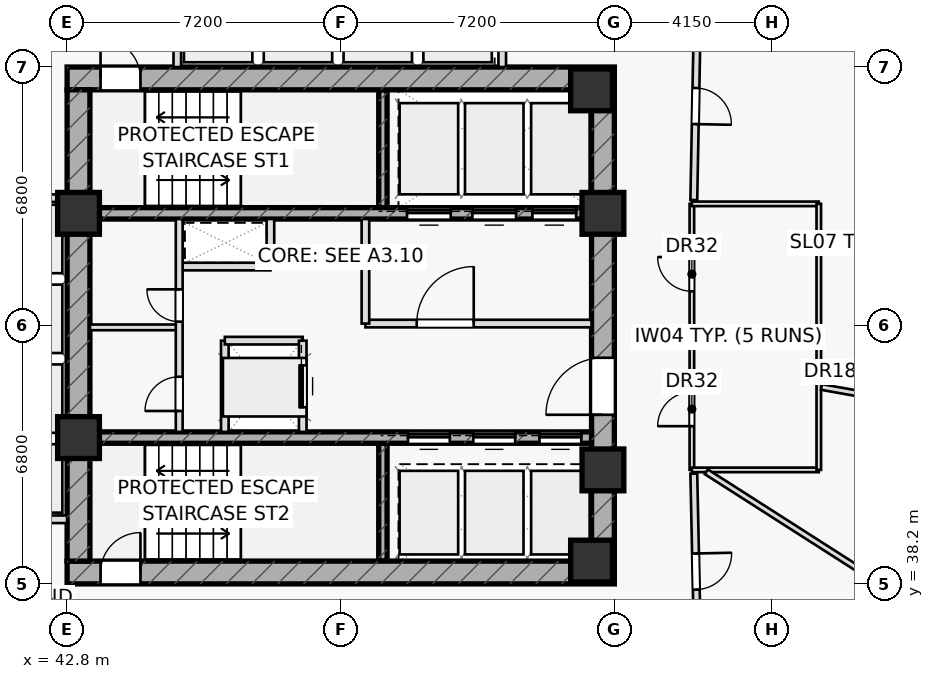
"""IFC4 building model, lengths in metres.
Left out: names, types, materials, properties, quantities, classifications, styles, units other than length and angle.
Written with IfcOpenShell. Run it as: python <this file> out.ifc"""

import sys

from ifc_helpers import new_model, si_unit, direction, frame, frame_2d, origin, origin_2d, place, context, subcontext, project, spatial, rectangle, extrude, element, fill, save


model = new_model("IFC4")
c1 = context("Model", 3, precision=1e-05, world=origin(), true_north=direction((0.0, 1.0)))
c2 = subcontext(c1, "Body", "Model", "MODEL_VIEW")
j1 = project(units=[si_unit("LENGTHUNIT", "METRE"), si_unit("PLANEANGLEUNIT", "RADIAN")], contexts=[c1])
p1 = place(None, origin())
s1 = spatial("IfcSite", under=j1, at=p1, CompositionType="ELEMENT")
p2 = place(p1, origin())
s2 = spatial("IfcBuilding", under=s1, at=p2, CompositionType="ELEMENT")
p3 = place(p2, frame((0.0, 0.0, 110.4)))
s3 = spatial("IfcBuildingStorey", under=s2, at=p3, CompositionType="ELEMENT", Elevation=110.4)
for number, where, z_axis, x_axis in (
    (1, (51.11, 48.1, 0.0), (0.0, 0.0, 1.0), (0.0, 1.0, 0.0)),
    (2, (51.11, 38.8, 0.0), (0.0, 0.0, 1.0), (0.0, 1.0, 0.0)),
):
    element("IfcWall", number, at=place(p3, frame(where, z_axis=z_axis, x_axis=x_axis)), inside=s3, PredefinedType="SHEAR", context=c2, shape_type="SweptSolid", body=[
        extrude(rectangle(XDim=3.1, YDim=0.22, at=frame_2d((1.55, 0.0))), origin(), (0.0, 0.0, 1.0), 4.9),
    ])
p4 = place(p3, frame((42.8, 51.5, 0.0), z_axis=(0.0, 0.0, 1.0), x_axis=(1.0, 0.0, 0.0)))
e3 = element("IfcWall", 3, at=p4, inside=s3, PredefinedType="SHEAR", context=c2, shape_type="SweptSolid", body=[
    extrude(rectangle(XDim=14.4, YDim=0.6, at=frame_2d((7.2, 0.0))), origin(), (0.0, 0.0, 1.0), 4.9),
])
p5 = place(p4, frame((0.88, 0.0, 0.0)))
e4 = element("IfcOpeningElement", 4, at=p5, cuts=e3, PredefinedType="OPENING", context=c2, shape_type="SweptSolid", body=[
    extrude(rectangle(XDim=1.05, YDim=2.2, at=frame_2d((0.525, 1.1))), frame((0.0, 0.31, 0.0), z_axis=(0.0, -1.0, 0.0), x_axis=(1.0, 0.0, 0.0)), (0.0, 0.0, 1.0), 0.62),
])
p6 = place(p3, frame((42.8, 38.5, 0.0), z_axis=(0.0, 0.0, 1.0), x_axis=(1.0, 0.0, 0.0)))
e5 = element("IfcWall", 5, at=p6, inside=s3, PredefinedType="SHEAR", context=c2, shape_type="SweptSolid", body=[
    extrude(rectangle(XDim=14.4, YDim=0.6, at=frame_2d((7.2, 0.0))), origin(), (0.0, 0.0, 1.0), 4.9),
])
p7 = place(p6, frame((0.88, 0.0, 0.0)))
e6 = element("IfcOpeningElement", 6, at=p7, cuts=e5, PredefinedType="OPENING", context=c2, shape_type="SweptSolid", body=[
    extrude(rectangle(XDim=1.05, YDim=2.2, at=frame_2d((0.525, 1.1))), frame((0.0, 0.31, 0.0), z_axis=(0.0, -1.0, 0.0), x_axis=(1.0, 0.0, 0.0)), (0.0, 0.0, 1.0), 0.62),
])
p8 = place(p3, frame((43.1, 38.8, 0.0), z_axis=(0.0, 0.0, 1.0), x_axis=(0.0, 1.0, 0.0)))
e7 = element("IfcWall", 7, at=p8, inside=s3, PredefinedType="SHEAR", context=c2, shape_type="SweptSolid", body=[
    extrude(rectangle(XDim=12.4, YDim=0.6, at=frame_2d((6.2, 0.0))), origin(), (0.0, 0.0, 1.0), 4.9),
])
p9 = place(p3, frame((56.9, 38.8, 0.0), z_axis=(0.0, 0.0, 1.0), x_axis=(0.0, 1.0, 0.0)))
e8 = element("IfcWall", 8, at=p9, inside=s3, PredefinedType="SHEAR", context=c2, shape_type="SweptSolid", body=[
    extrude(rectangle(XDim=12.4, YDim=0.6, at=frame_2d((6.2, 0.0))), origin(), (0.0, 0.0, 1.0), 4.9),
])
p10 = place(p9, frame((3.85, 0.0, 0.0)))
e9 = element("IfcOpeningElement", 9, at=p10, cuts=e8, PredefinedType="OPENING", context=c2, shape_type="SweptSolid", body=[
    extrude(rectangle(XDim=1.5, YDim=2.2, at=frame_2d((0.75, 1.1))), frame((0.0, 0.31, 0.0), z_axis=(0.0, -1.0, 0.0), x_axis=(1.0, 0.0, 0.0)), (0.0, 0.0, 1.0), 0.62),
])
p11 = place(p3, frame((43.4, 47.95, 0.0), z_axis=(0.0, 0.0, 1.0), x_axis=(1.0, 0.0, 0.0)))
e10 = element("IfcWall", 10, at=p11, inside=s3, PredefinedType="SHEAR", context=c2, shape_type="SweptSolid", body=[
    extrude(rectangle(XDim=13.2, YDim=0.3, at=frame_2d((6.6, 0.0))), origin(), (0.0, 0.0, 1.0), 4.9),
])
p12 = place(p11, frame((8.345, 0.0, 0.0)))
e11 = element("IfcOpeningElement", 11, at=p12, cuts=e10, PredefinedType="OPENING", context=c2, shape_type="SweptSolid", body=[
    extrude(rectangle(XDim=1.15, YDim=2.2, at=frame_2d((0.575, 1.1))), frame((0.0, 0.16, 0.0), z_axis=(0.0, -1.0, 0.0), x_axis=(1.0, 0.0, 0.0)), (0.0, 0.0, 1.0), 0.32),
])
p13 = place(p11, frame((10.065, 0.0, 0.0)))
e12 = element("IfcOpeningElement", 12, at=p13, cuts=e10, PredefinedType="OPENING", context=c2, shape_type="SweptSolid", body=[
    extrude(rectangle(XDim=1.15, YDim=2.2, at=frame_2d((0.575, 1.1))), frame((0.0, 0.16, 0.0), z_axis=(0.0, -1.0, 0.0), x_axis=(1.0, 0.0, 0.0)), (0.0, 0.0, 1.0), 0.32),
])
p14 = place(p11, frame((11.645, 0.0, 0.0)))
e13 = element("IfcOpeningElement", 13, at=p14, cuts=e10, PredefinedType="OPENING", context=c2, shape_type="SweptSolid", body=[
    extrude(rectangle(XDim=1.15, YDim=2.2, at=frame_2d((0.575, 1.1))), frame((0.0, 0.16, 0.0), z_axis=(0.0, -1.0, 0.0), x_axis=(1.0, 0.0, 0.0)), (0.0, 0.0, 1.0), 0.32),
])
p15 = place(p3, frame((43.4, 42.05, 0.0), z_axis=(0.0, 0.0, 1.0), x_axis=(1.0, 0.0, 0.0)))
e14 = element("IfcWall", 14, at=p15, inside=s3, PredefinedType="SHEAR", context=c2, shape_type="SweptSolid", body=[
    extrude(rectangle(XDim=13.2, YDim=0.3, at=frame_2d((6.6, 0.0))), origin(), (0.0, 0.0, 1.0), 4.9),
])
p16 = place(p15, frame((8.37, 0.0, 0.0)))
e15 = element("IfcOpeningElement", 15, at=p16, cuts=e14, PredefinedType="OPENING", context=c2, shape_type="SweptSolid", body=[
    extrude(rectangle(XDim=1.1, YDim=2.15, at=frame_2d((0.55, 1.075))), frame((0.0, 0.16, 0.0), z_axis=(0.0, -1.0, 0.0), x_axis=(1.0, 0.0, 0.0)), (0.0, 0.0, 1.0), 0.32),
])
p17 = place(p15, frame((10.09, 0.0, 0.0)))
e16 = element("IfcOpeningElement", 16, at=p17, cuts=e14, PredefinedType="OPENING", context=c2, shape_type="SweptSolid", body=[
    extrude(rectangle(XDim=1.1, YDim=2.15, at=frame_2d((0.55, 1.075))), frame((0.0, 0.16, 0.0), z_axis=(0.0, -1.0, 0.0), x_axis=(1.0, 0.0, 0.0)), (0.0, 0.0, 1.0), 0.32),
])
p18 = place(p15, frame((11.83, 0.0, 0.0)))
e17 = element("IfcOpeningElement", 17, at=p18, cuts=e14, PredefinedType="OPENING", context=c2, shape_type="SweptSolid", body=[
    extrude(rectangle(XDim=1.1, YDim=2.15, at=frame_2d((0.55, 1.075))), frame((0.0, 0.16, 0.0), z_axis=(0.0, -1.0, 0.0), x_axis=(1.0, 0.0, 0.0)), (0.0, 0.0, 1.0), 0.32),
])
for number, where, z_axis, x_axis in (
    (18, (43.1, 47.95, 0.0), (0.0, 0.0, 1.0), (1.0, 0.0, 0.0)),
    (19, (56.9, 47.95, 0.0), (0.0, 0.0, 1.0), (1.0, 0.0, 0.0)),
    (20, (56.6, 51.2, 0.0), (0.0, 0.0, 1.0), (1.0, 0.0, 0.0)),
    (21, (43.1, 42.05, 0.0), (0.0, 0.0, 1.0), (1.0, 0.0, 0.0)),
    (22, (56.9, 41.2, 0.0), (0.0, 0.0, 1.0), (1.0, 0.0, 0.0)),
    (23, (56.6, 38.8, 0.0), (0.0, 0.0, 1.0), (1.0, 0.0, 0.0)),
):
    element("IfcColumn", number, at=place(p3, frame(where, z_axis=z_axis, x_axis=x_axis)), inside=s3, PredefinedType="COLUMN", context=c2, shape_type="SweptSolid", body=[
        extrude(rectangle(XDim=1.1, YDim=1.1, at=origin_2d()), origin(), (0.0, 0.0, 1.0), 4.9),
    ])
for number, where, z_axis, x_axis in (
    (24, (40.3, 39.9, 0.0), (0.0, 0.0, 1.0), (1.0, 0.0, 0.0)),
    (25, (40.3, 48.35, 0.0), (0.0, 0.0, 1.0), (1.0, 0.0, 0.0)),
    (26, (45.7, 51.8, 0.0), (0.0, 0.0, 1.0), (0.0, 1.0, 0.0)),
    (27, (54.25, 51.8, 0.0), (0.0, 0.0, 1.0), (0.0, 1.0, 0.0)),
):
    element("IfcWall", number, at=place(p3, frame(where, z_axis=z_axis, x_axis=x_axis)), inside=s3, PredefinedType="PARTITIONING", context=c2, shape_type="SweptSolid", body=[
        extrude(rectangle(XDim=2.5, YDim=0.2, at=frame_2d((1.25, 0.0))), origin(), (0.0, 0.0, 1.0), 4.9),
    ])
p19 = place(p3, frame((45.75, 46.55, 0.0), z_axis=(0.0, 0.0, 1.0), x_axis=(1.0, 0.0, 0.0)))
e28 = element("IfcWall", 28, at=p19, inside=s3, PredefinedType="PARTITIONING", context=c2, shape_type="SweptSolid", body=[
    extrude(rectangle(XDim=2.4, YDim=0.2, at=frame_2d((1.2, 0.0))), origin(), (0.0, 0.0, 1.0), 4.9),
])
p20 = place(p3, frame((48.15, 46.55, 0.0), z_axis=(0.0, 0.0, 1.0), x_axis=(0.0, 1.0, 0.0)))
e29 = element("IfcWall", 29, at=p20, inside=s3, PredefinedType="PARTITIONING", context=c2, shape_type="SweptSolid", body=[
    extrude(rectangle(XDim=1.25, YDim=0.2, at=frame_2d((0.625, 0.0))), origin(), (0.0, 0.0, 1.0), 4.9),
])
p21 = place(p3, frame((46.95, 42.2, 0.0), z_axis=(0.0, 0.0, 1.0), x_axis=(0.0, 1.0, 0.0)))
e30 = element("IfcWall", 30, at=p21, inside=s3, PredefinedType="PARTITIONING", context=c2, shape_type="SweptSolid", body=[
    extrude(rectangle(XDim=2.4, YDim=0.2, at=frame_2d((1.2, 0.0))), origin(), (0.0, 0.0, 1.0), 4.9),
])
p22 = place(p3, frame((46.95, 44.6, 0.0), z_axis=(0.0, 0.0, 1.0), x_axis=(1.0, 0.0, 0.0)))
e31 = element("IfcWall", 31, at=p22, inside=s3, PredefinedType="PARTITIONING", context=c2, shape_type="SweptSolid", body=[
    extrude(rectangle(XDim=2.05, YDim=0.2, at=frame_2d((1.025, 0.0))), origin(), (0.0, 0.0, 1.0), 4.9),
])
p23 = place(p3, frame((50.65, 45.05, 0.0), z_axis=(0.0, 0.0, 1.0), x_axis=(1.0, 0.0, 0.0)))
e32 = element("IfcWall", 32, at=p23, inside=s3, PredefinedType="PARTITIONING", context=c2, shape_type="SweptSolid", body=[
    extrude(rectangle(XDim=5.95, YDim=0.2, at=frame_2d((2.975, 0.0))), origin(), (0.0, 0.0, 1.0), 4.9),
])
p24 = place(p23, frame((1.35, 0.0, 0.0)))
e33 = element("IfcOpeningElement", 33, at=p24, cuts=e32, PredefinedType="OPENING", context=c2, shape_type="SweptSolid", body=[
    extrude(rectangle(XDim=1.5, YDim=2.2, at=frame_2d((0.75, 1.1))), frame((0.0, 0.11, 0.0), z_axis=(0.0, -1.0, 0.0), x_axis=(1.0, 0.0, 0.0)), (0.0, 0.0, 1.0), 0.22),
])
p25 = place(p3, frame((50.65, 45.05, 0.0), z_axis=(0.0, 0.0, 1.0), x_axis=(0.0, 1.0, 0.0)))
e34 = element("IfcWall", 34, at=p25, inside=s3, PredefinedType="PARTITIONING", context=c2, shape_type="SweptSolid", body=[
    extrude(rectangle(XDim=2.75, YDim=0.2, at=frame_2d((1.375, 0.0))), origin(), (0.0, 0.0, 1.0), 4.9),
])
p26 = place(p3, frame((43.4, 44.95, 0.0), z_axis=(0.0, 0.0, 1.0), x_axis=(1.0, 0.0, 0.0)))
e35 = element("IfcWall", 35, at=p26, inside=s3, PredefinedType="PARTITIONING", context=c2, shape_type="SweptSolid", body=[
    extrude(rectangle(XDim=2.35, YDim=0.15, at=frame_2d((1.175, 0.0))), origin(), (0.0, 0.0, 1.0), 4.9),
])
p27 = place(p3, frame((45.75, 42.2, 0.0), z_axis=(0.0, 0.0, 1.0), x_axis=(0.0, 1.0, 0.0)))
e36 = element("IfcWall", 36, at=p27, inside=s3, PredefinedType="PARTITIONING", context=c2, shape_type="SweptSolid", body=[
    extrude(rectangle(XDim=5.6, YDim=0.18, at=frame_2d((2.8, 0.0))), origin(), (0.0, 0.0, 1.0), 4.9),
])
p28 = place(p27, frame((0.55, 0.0, 0.0)))
e37 = element("IfcOpeningElement", 37, at=p28, cuts=e36, PredefinedType="OPENING", context=c2, shape_type="SweptSolid", body=[
    extrude(rectangle(XDim=0.9, YDim=2.05, at=frame_2d((0.45, 1.025))), frame((0.0, 0.1, 0.0), z_axis=(0.0, -1.0, 0.0), x_axis=(1.0, 0.0, 0.0)), (0.0, 0.0, 1.0), 0.2),
])
p29 = place(p27, frame((2.9, 0.0, 0.0)))
e38 = element("IfcOpeningElement", 38, at=p29, cuts=e36, PredefinedType="OPENING", context=c2, shape_type="SweptSolid", body=[
    extrude(rectangle(XDim=0.85, YDim=2.05, at=frame_2d((0.425, 1.025))), frame((0.0, 0.1, 0.0), z_axis=(0.0, -1.0, 0.0), x_axis=(1.0, 0.0, 0.0)), (0.0, 0.0, 1.0), 0.2),
])
p30 = place(p3, frame((59.24, 41.2, 0.0), z_axis=(0.0, 0.0, 1.0), x_axis=(0.0, 1.0, 0.0)))
e39 = element("IfcWall", 39, at=p30, inside=s3, PredefinedType="PARTITIONING", context=c2, shape_type="SweptSolid", body=[
    extrude(rectangle(XDim=7.0, YDim=0.12, at=frame_2d((3.5, 0.0))), origin(), (0.0, 0.0, 1.0), 4.9),
])
p31 = place(p30, frame((1.15, 0.0, 0.0)))
e40 = element("IfcOpeningElement", 40, at=p31, cuts=e39, PredefinedType="OPENING", context=c2, shape_type="SweptSolid", body=[
    extrude(rectangle(XDim=0.9, YDim=2.05, at=frame_2d((0.45, 1.025))), frame((0.0, 0.07, 0.0), z_axis=(0.0, -1.0, 0.0), x_axis=(1.0, 0.0, 0.0)), (0.0, 0.0, 1.0), 0.14),
])
p32 = place(p30, frame((4.7, 0.0, 0.0)))
e41 = element("IfcOpeningElement", 41, at=p32, cuts=e39, PredefinedType="OPENING", context=c2, shape_type="SweptSolid", body=[
    extrude(rectangle(XDim=0.9, YDim=2.05, at=frame_2d((0.45, 1.025))), frame((0.0, 0.07, 0.0), z_axis=(0.0, -1.0, 0.0), x_axis=(1.0, 0.0, 0.0)), (0.0, 0.0, 1.0), 0.14),
])
for number, where, z_axis, x_axis in (
    (42, (59.24, 41.2, 0.0), (0.0, 0.0, 1.0), (1.0, 0.0, 0.0)),
    (43, (59.24, 44.65, 0.0), (0.0, 0.0, 1.0), (1.0, 0.0, 0.0)),
    (44, (59.24, 48.2, 0.0), (0.0, 0.0, 1.0), (1.0, 0.0, 0.0)),
):
    element("IfcWall", number, at=place(p3, frame(where, z_axis=z_axis, x_axis=x_axis)), inside=s3, PredefinedType="PARTITIONING", context=c2, shape_type="SweptSolid", body=[
        extrude(rectangle(XDim=3.34, YDim=0.12, at=frame_2d((1.67, 0.0))), origin(), (0.0, 0.0, 1.0), 4.9),
    ])
p33 = place(p3, frame((62.58, 41.2, 0.0), z_axis=(0.0, 0.0, 1.0), x_axis=(0.0, 1.0, 0.0)))
e45 = element("IfcWall", 45, at=p33, inside=s3, PredefinedType="PARTITIONING", context=c2, shape_type="SweptSolid", body=[
    extrude(rectangle(XDim=7.0, YDim=0.12, at=frame_2d((3.5, 0.0))), origin(), (0.0, 0.0, 1.0), 4.9),
])
p34 = place(p3, frame((59.621, 41.15, 0.0), z_axis=(0.0, 0.0, 1.0), x_axis=(0.842493606908, -0.538706341451, 0.0)))
e46 = element("IfcWall", 46, at=p34, inside=s3, PredefinedType="PARTITIONING", context=c2, shape_type="SweptSolid", body=[
    extrude(rectangle(XDim=18.711, YDim=0.15, at=frame_2d((9.355, 0.0))), origin(), (0.0, 0.0, 1.0), 4.185),
])
p35 = place(p3, frame((62.65, 43.381, 0.0), z_axis=(0.0, 0.0, 1.0), x_axis=(0.984377109133, -0.176073016146, 0.0)))
e47 = element("IfcWall", 47, at=p35, inside=s3, PredefinedType="PARTITIONING", context=c2, shape_type="SweptSolid", body=[
    extrude(rectangle(XDim=21.754, YDim=0.15, at=frame_2d((10.877, 0.0))), origin(), (0.0, 0.0, 1.0), 4.185),
])
p36 = place(p35, frame((1.35, 0.0, 0.0)))
e48 = element("IfcOpeningElement", 48, at=p36, cuts=e47, PredefinedType="OPENING", context=c2, shape_type="SweptSolid", body=[
    extrude(rectangle(XDim=0.95, YDim=2.05, at=frame_2d((0.475, 1.025))), frame((0.0, 0.085, 0.0), z_axis=(0.0, -1.0, 0.0), x_axis=(1.0, 0.0, 0.0)), (0.0, 0.0, 1.0), 0.17),
])
p37 = place(p3, frame((59.401, 54.05, 0.0), z_axis=(0.0, 0.0, 1.0), x_axis=(-0.019103170983, -0.999817517779, 0.0)))
e49 = element("IfcWall", 49, at=p37, inside=s3, PredefinedType="PARTITIONING", context=c2, shape_type="SweptSolid", body=[
    extrude(rectangle(XDim=5.751, YDim=0.18, at=frame_2d((2.875, 0.0))), origin(), (0.0, 0.0, 1.0), 4.185),
])
p38 = place(p37, frame((2.802, 0.0, 0.0)))
e50 = element("IfcOpeningElement", 50, at=p38, cuts=e49, PredefinedType="OPENING", context=c2, shape_type="SweptSolid", body=[
    extrude(rectangle(XDim=0.95, YDim=2.05, at=frame_2d((0.475, 1.025))), frame((0.0, 0.1, 0.0), z_axis=(0.0, -1.0, 0.0), x_axis=(1.0, 0.0, 0.0)), (0.0, 0.0, 1.0), 0.2),
])
p39 = place(p3, frame((59.291, 41.1, 0.0), z_axis=(0.0, 0.0, 1.0), x_axis=(0.021374589398, -0.999771537366, 0.0)))
e51 = element("IfcWall", 51, at=p39, inside=s3, PredefinedType="PARTITIONING", context=c2, shape_type="SweptSolid", body=[
    extrude(rectangle(XDim=5.151, YDim=0.18, at=frame_2d((2.576, 0.0))), origin(), (0.0, 0.0, 1.0), 4.185),
])
p40 = place(p39, frame((2.101, 0.0, 0.0)))
e52 = element("IfcOpeningElement", 52, at=p40, cuts=e51, PredefinedType="OPENING", context=c2, shape_type="SweptSolid", body=[
    extrude(rectangle(XDim=0.95, YDim=2.05, at=frame_2d((0.475, 1.025))), frame((0.0, 0.1, 0.0), z_axis=(0.0, -1.0, 0.0), x_axis=(1.0, 0.0, 0.0)), (0.0, 0.0, 1.0), 0.2),
])
p41 = place(p3, frame((49.0, 42.2, 0.0), z_axis=(0.0, 0.0, 1.0), x_axis=(0.0, 1.0, 0.0)))
e53 = element("IfcWall", 53, at=p41, inside=s3, PredefinedType="PARTITIONING", context=c2, shape_type="SweptSolid", body=[
    extrude(rectangle(XDim=2.4, YDim=0.2, at=frame_2d((1.2, 0.0))), origin(), (0.0, 0.0, 1.0), 4.9),
])
p42 = place(p41, frame((0.65, 0.0, 0.0)))
e54 = element("IfcOpeningElement", 54, at=p42, cuts=e53, PredefinedType="OPENING", context=c2, shape_type="SweptSolid", body=[
    extrude(rectangle(XDim=1.1, YDim=2.15, at=frame_2d((0.55, 1.075))), frame((0.0, 0.11, 0.0), z_axis=(0.0, -1.0, 0.0), x_axis=(1.0, 0.0, 0.0)), (0.0, 0.0, 1.0), 0.22),
])
p43 = place(p5, origin())
e55 = element("IfcDoor", 55, at=p43, inside=s3, OperationType="SINGLE_SWING_LEFT", PredefinedType="DOOR", context=c2, shape_type="SweptSolid", body=[
    extrude(rectangle(XDim=1.05, YDim=2.2, at=frame_2d((0.525, 1.1))), frame((0.0, 0.025, 0.0), z_axis=(0.0, -1.0, 0.0), x_axis=(1.0, 0.0, 0.0)), (0.0, 0.0, 1.0), 0.05),
])
fill(e4, e55)
p44 = place(p7, origin())
e56 = element("IfcDoor", 56, at=p44, inside=s3, OperationType="SINGLE_SWING_RIGHT", PredefinedType="DOOR", context=c2, shape_type="SweptSolid", body=[
    extrude(rectangle(XDim=1.05, YDim=2.2, at=frame_2d((0.525, 1.1))), frame((0.0, 0.025, 0.0), z_axis=(0.0, -1.0, 0.0), x_axis=(1.0, 0.0, 0.0)), (0.0, 0.0, 1.0), 0.05),
])
fill(e6, e56)
p45 = place(p10, origin())
e57 = element("IfcDoor", 57, at=p45, inside=s3, OperationType="SINGLE_SWING_LEFT", PredefinedType="DOOR", context=c2, shape_type="SweptSolid", body=[
    extrude(rectangle(XDim=1.5, YDim=2.2, at=frame_2d((0.75, 1.1))), frame((0.0, 0.025, 0.0), z_axis=(0.0, -1.0, 0.0), x_axis=(1.0, 0.0, 0.0)), (0.0, 0.0, 1.0), 0.05),
])
fill(e9, e57)
p46 = place(p24, origin())
e58 = element("IfcDoor", 58, at=p46, inside=s3, OperationType="SINGLE_SWING_RIGHT", PredefinedType="DOOR", context=c2, shape_type="SweptSolid", body=[
    extrude(rectangle(XDim=1.5, YDim=2.2, at=frame_2d((0.75, 1.1))), frame((0.0, 0.025, 0.0), z_axis=(0.0, -1.0, 0.0), x_axis=(1.0, 0.0, 0.0)), (0.0, 0.0, 1.0), 0.05),
])
fill(e33, e58)
p47 = place(p28, origin())
e59 = element("IfcDoor", 59, at=p47, inside=s3, OperationType="SINGLE_SWING_LEFT", PredefinedType="DOOR", context=c2, shape_type="SweptSolid", body=[
    extrude(rectangle(XDim=0.9, YDim=2.05, at=frame_2d((0.45, 1.025))), frame((0.0, 0.025, 0.0), z_axis=(0.0, -1.0, 0.0), x_axis=(1.0, 0.0, 0.0)), (0.0, 0.0, 1.0), 0.05),
])
fill(e37, e59)
p48 = place(p29, origin())
e60 = element("IfcDoor", 60, at=p48, inside=s3, OperationType="SINGLE_SWING_RIGHT", PredefinedType="DOOR", context=c2, shape_type="SweptSolid", body=[
    extrude(rectangle(XDim=0.85, YDim=2.05, at=frame_2d((0.425, 1.025))), frame((0.0, 0.025, 0.0), z_axis=(0.0, -1.0, 0.0), x_axis=(1.0, 0.0, 0.0)), (0.0, 0.0, 1.0), 0.05),
])
fill(e38, e60)
p49 = place(p31, origin())
e61 = element("IfcDoor", 61, at=p49, inside=s3, OperationType="SINGLE_SWING_LEFT", PredefinedType="DOOR", context=c2, shape_type="SweptSolid", body=[
    extrude(rectangle(XDim=0.9, YDim=2.05, at=frame_2d((0.45, 1.025))), frame((0.0, 0.025, 0.0), z_axis=(0.0, -1.0, 0.0), x_axis=(1.0, 0.0, 0.0)), (0.0, 0.0, 1.0), 0.05),
])
fill(e40, e61)
p50 = place(p32, origin())
e62 = element("IfcDoor", 62, at=p50, inside=s3, OperationType="SINGLE_SWING_RIGHT", PredefinedType="DOOR", context=c2, shape_type="SweptSolid", body=[
    extrude(rectangle(XDim=0.9, YDim=2.05, at=frame_2d((0.45, 1.025))), frame((0.0, 0.025, 0.0), z_axis=(0.0, -1.0, 0.0), x_axis=(1.0, 0.0, 0.0)), (0.0, 0.0, 1.0), 0.05),
])
fill(e41, e62)
p51 = place(p38, origin())
e63 = element("IfcDoor", 63, at=p51, inside=s3, OperationType="SINGLE_SWING_RIGHT", PredefinedType="DOOR", context=c2, shape_type="SweptSolid", body=[
    extrude(rectangle(XDim=0.95, YDim=2.05, at=frame_2d((0.475, 1.025))), frame((0.0, 0.025, 0.0), z_axis=(0.0, -1.0, 0.0), x_axis=(1.0, 0.0, 0.0)), (0.0, 0.0, 1.0), 0.05),
])
fill(e50, e63)
p52 = place(p40, origin())
e64 = element("IfcDoor", 64, at=p52, inside=s3, OperationType="SINGLE_SWING_LEFT", PredefinedType="DOOR", context=c2, shape_type="SweptSolid", body=[
    extrude(rectangle(XDim=0.95, YDim=2.05, at=frame_2d((0.475, 1.025))), frame((0.0, 0.025, 0.0), z_axis=(0.0, -1.0, 0.0), x_axis=(1.0, 0.0, 0.0)), (0.0, 0.0, 1.0), 0.05),
])
fill(e52, e64)
p53 = place(p12, origin())
e65 = element("IfcDoor", 65, at=p53, inside=s3, OperationType="SLIDING_TO_LEFT", PredefinedType="DOOR", context=c2, shape_type="SweptSolid", body=[
    extrude(rectangle(XDim=1.15, YDim=2.2, at=frame_2d((0.575, 1.1))), frame((0.0, 0.025, 0.0), z_axis=(0.0, -1.0, 0.0), x_axis=(1.0, 0.0, 0.0)), (0.0, 0.0, 1.0), 0.05),
])
fill(e11, e65)
p54 = place(p13, origin())
e66 = element("IfcDoor", 66, at=p54, inside=s3, OperationType="SLIDING_TO_LEFT", PredefinedType="DOOR", context=c2, shape_type="SweptSolid", body=[
    extrude(rectangle(XDim=1.15, YDim=2.2, at=frame_2d((0.575, 1.1))), frame((0.0, 0.025, 0.0), z_axis=(0.0, -1.0, 0.0), x_axis=(1.0, 0.0, 0.0)), (0.0, 0.0, 1.0), 0.05),
])
fill(e12, e66)
p55 = place(p14, origin())
e67 = element("IfcDoor", 67, at=p55, inside=s3, OperationType="SLIDING_TO_LEFT", PredefinedType="DOOR", context=c2, shape_type="SweptSolid", body=[
    extrude(rectangle(XDim=1.15, YDim=2.2, at=frame_2d((0.575, 1.1))), frame((0.0, 0.025, 0.0), z_axis=(0.0, -1.0, 0.0), x_axis=(1.0, 0.0, 0.0)), (0.0, 0.0, 1.0), 0.05),
])
fill(e13, e67)
p56 = place(p16, origin())
e68 = element("IfcDoor", 68, at=p56, inside=s3, OperationType="SLIDING_TO_LEFT", PredefinedType="DOOR", context=c2, shape_type="SweptSolid", body=[
    extrude(rectangle(XDim=1.1, YDim=2.15, at=frame_2d((0.55, 1.075))), frame((0.0, 0.025, 0.0), z_axis=(0.0, -1.0, 0.0), x_axis=(1.0, 0.0, 0.0)), (0.0, 0.0, 1.0), 0.05),
])
fill(e15, e68)
p57 = place(p17, origin())
e69 = element("IfcDoor", 69, at=p57, inside=s3, OperationType="SLIDING_TO_LEFT", PredefinedType="DOOR", context=c2, shape_type="SweptSolid", body=[
    extrude(rectangle(XDim=1.1, YDim=2.15, at=frame_2d((0.55, 1.075))), frame((0.0, 0.025, 0.0), z_axis=(0.0, -1.0, 0.0), x_axis=(1.0, 0.0, 0.0)), (0.0, 0.0, 1.0), 0.05),
])
fill(e16, e69)
p58 = place(p18, origin())
e70 = element("IfcDoor", 70, at=p58, inside=s3, OperationType="SLIDING_TO_LEFT", PredefinedType="DOOR", context=c2, shape_type="SweptSolid", body=[
    extrude(rectangle(XDim=1.1, YDim=2.15, at=frame_2d((0.55, 1.075))), frame((0.0, 0.025, 0.0), z_axis=(0.0, -1.0, 0.0), x_axis=(1.0, 0.0, 0.0)), (0.0, 0.0, 1.0), 0.05),
])
fill(e17, e70)
p59 = place(p42, origin())
e71 = element("IfcDoor", 71, at=p59, inside=s3, OperationType="SLIDING_TO_RIGHT", PredefinedType="DOOR", context=c2, shape_type="SweptSolid", body=[
    extrude(rectangle(XDim=1.1, YDim=2.15, at=frame_2d((0.55, 1.075))), frame((0.0, 0.025, 0.0), z_axis=(0.0, -1.0, 0.0), x_axis=(1.0, 0.0, 0.0)), (0.0, 0.0, 1.0), 0.05),
])
fill(e54, e71)
save(model, sys.argv[1])
